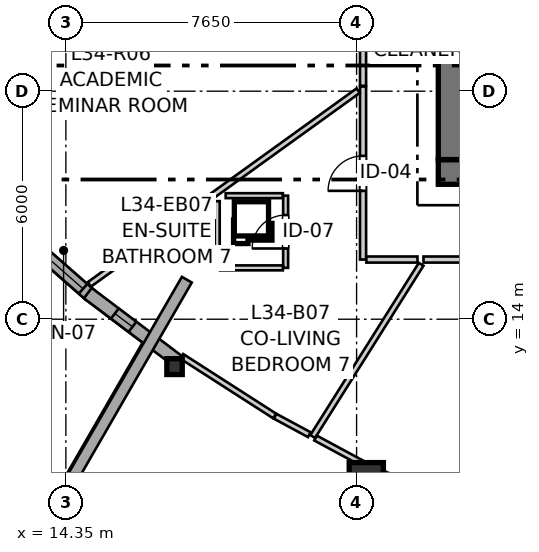
"""IFC4 building model, lengths in metres.
Left out: names, types, materials, properties, quantities, classifications, styles, units other than length and angle.
Written with IfcOpenShell. Run it as: python <this file> out.ifc"""

import sys

from ifc_helpers import new_model, si_unit, direction, frame, frame_2d, origin, origin_2d, place, context, subcontext, project, spatial, rectangle, i_section, extrude, source, transform, mapped, element, fill, save


model = new_model("IFC4")
c1 = context("Model", 3, precision=1e-05, world=origin(), true_north=direction((0.0, 1.0)))
c2 = subcontext(c1, "Body", "Model", "MODEL_VIEW")
j1 = project(units=[si_unit("LENGTHUNIT", "METRE"), si_unit("PLANEANGLEUNIT", "RADIAN")], contexts=[c1])
p1 = place(None, origin())
s1 = spatial("IfcSite", under=j1, at=p1, CompositionType="ELEMENT")
p2 = place(p1, origin())
s2 = spatial("IfcBuilding", under=s1, at=p2, CompositionType="ELEMENT")
p3 = place(p2, frame((0.0, 0.0, 115.2)))
s3 = spatial("IfcBuildingStorey", under=s2, at=p3, CompositionType="ELEMENT", Elevation=115.2)
p4 = place(p3, frame((24.15, 17.875, 0.0), z_axis=(0.0, 0.0, 1.0), x_axis=(1.0, 0.0, 0.0)))
e1 = element("IfcWall", 1, at=p4, inside=s3, PredefinedType="SHEAR", context=c2, shape_type="SweptSolid", body=[
    extrude(rectangle(XDim=12.4, YDim=0.65, at=frame_2d((6.2, 0.0))), origin(), (0.0, 0.0, 1.0), 2.95),
])
p5 = place(p3, frame((24.475, 33.8, 0.0), z_axis=(0.0, 0.0, 1.0), x_axis=(0.0, -1.0, 0.0)))
e2 = element("IfcWall", 2, at=p5, inside=s3, PredefinedType="SHEAR", context=c2, shape_type="SweptSolid", body=[
    extrude(rectangle(XDim=15.6, YDim=0.65, at=frame_2d((7.8, 0.0))), origin(), (0.0, 0.0, 1.0), 2.95),
])
p6 = place(p5, frame((7.05, 0.0, 0.0)))
e3 = element("IfcOpeningElement", 3, at=p6, cuts=e2, PredefinedType="OPENING", context=c2, shape_type="SweptSolid", body=[
    extrude(rectangle(XDim=1.5, YDim=2.15, at=frame_2d((0.75, 1.075))), frame((0.0, 0.335, 0.0), z_axis=(0.0, -1.0, 0.0), x_axis=(1.0, 0.0, 0.0)), (0.0, 0.0, 1.0), 0.67),
])
p7 = place(p5, frame((3.52, 0.0, 0.0)))
e4 = element("IfcOpeningElement", 4, at=p7, cuts=e2, PredefinedType="OPENING", context=c2, shape_type="SweptSolid", body=[
    extrude(rectangle(XDim=0.86, YDim=2.05, at=frame_2d((0.43, 1.025))), frame((0.0, 0.335, 0.0), z_axis=(0.0, -1.0, 0.0), x_axis=(1.0, 0.0, 0.0)), (0.0, 0.0, 1.0), 0.67),
])
p8 = place(p5, frame((11.22, 0.0, 0.0)))
e5 = element("IfcOpeningElement", 5, at=p8, cuts=e2, PredefinedType="OPENING", context=c2, shape_type="SweptSolid", body=[
    extrude(rectangle(XDim=0.86, YDim=2.05, at=frame_2d((0.43, 1.025))), frame((0.0, 0.335, 0.0), z_axis=(0.0, -1.0, 0.0), x_axis=(1.0, 0.0, 0.0)), (0.0, 0.0, 1.0), 0.67),
])
m1 = source(origin(), c2, "Body", "SweptSolid", [
    extrude(i_section(OverallWidth=0.406, OverallDepth=0.416, WebThickness=0.027, FlangeThickness=0.044, FilletRadius=0.015, at=origin_2d()), origin(), (0.0, 0.0, 1.0), 2.95),
])
p9 = place(p3, frame((17.209, 12.753, 0.0), z_axis=(0.0, 0.0, 1.0), x_axis=(1.0, 0.0, 0.0)))
e6 = element("IfcColumn", 6, at=p9, inside=s3, PredefinedType="PILASTER", context=c2, shape_type="MappedRepresentation", body=[
    mapped(m1, transform((0.0, 0.0, 0.0), x_axis=(1.0, 0.0, 0.0), y_axis=(0.0, 1.0, 0.0), z_axis=(0.0, 0.0, 1.0), scale=1.0)),
])
m2 = source(origin(), c2, "Body", "SweptSolid", [
    extrude(rectangle(XDim=0.9, YDim=0.9, at=origin_2d()), origin(), (0.0, 0.0, 1.0), 2.95),
])
p10 = place(p3, frame((22.256, 9.778, 0.0), z_axis=(0.0, 0.0, 1.0), x_axis=(1.0, 0.0, 0.0)))
e7 = element("IfcColumn", 7, at=p10, inside=s3, PredefinedType="COLUMN", context=c2, shape_type="MappedRepresentation", body=[
    mapped(m2, transform((0.0, 0.0, 0.0), x_axis=(1.0, 0.0, 0.0), y_axis=(0.0, 1.0, 0.0), z_axis=(0.0, 0.0, 1.0), scale=1.0)),
])
p11 = place(p3, frame((12.901, 16.471, 0.0), z_axis=(0.0, 0.0, 1.0), x_axis=(0.751480442913, -0.659755366722, 0.0)))
e8 = element("IfcWall", 8, at=p11, inside=s3, PredefinedType="SOLIDWALL", context=c2, shape_type="SweptSolid", body=[
    extrude(rectangle(XDim=2.789, YDim=0.34, at=frame_2d((1.395, 0.0))), origin(), (0.0, 0.0, 1.0), 2.48),
])
p12 = place(p11, frame((0.43, 0.0, 0.82)))
e9 = element("IfcOpeningElement", 9, at=p12, cuts=e8, PredefinedType="OPENING", context=c2, shape_type="SweptSolid", body=[
    extrude(rectangle(XDim=2.1, YDim=1.4, at=frame_2d((1.05, 0.7))), frame((0.0, 0.18, 0.0), z_axis=(0.0, -1.0, 0.0), x_axis=(1.0, 0.0, 0.0)), (0.0, 0.0, 1.0), 0.36),
])
p13 = place(p3, frame((14.928, 14.686, 0.0), z_axis=(0.0, 0.0, 1.0), x_axis=(0.798387010211, -0.602144651995, 0.0)))
e10 = element("IfcWall", 10, at=p13, inside=s3, PredefinedType="SOLIDWALL", context=c2, shape_type="SweptSolid", body=[
    extrude(rectangle(XDim=2.966, YDim=0.34, at=frame_2d((1.483, 0.0))), origin(), (0.0, 0.0, 1.0), 2.48),
])
p14 = place(p13, frame((0.891, 0.0, 0.82)))
e11 = element("IfcOpeningElement", 11, at=p14, cuts=e10, PredefinedType="OPENING", context=c2, shape_type="SweptSolid", body=[
    extrude(rectangle(XDim=0.58, YDim=1.35, at=frame_2d((0.29, 0.675))), frame((0.0, 0.18, 0.0), z_axis=(0.0, -1.0, 0.0), x_axis=(1.0, 0.0, 0.0)), (0.0, 0.0, 1.0), 0.36),
])
p15 = place(p3, frame((17.533, 15.04, 0.0), z_axis=(0.0, 0.0, 1.0), x_axis=(-0.499995950774, -0.866027741594, 0.0)))
e12 = element("IfcWall", 12, at=p15, inside=s3, PredefinedType="SOLIDWALL", context=c2, shape_type="SweptSolid", body=[
    extrude(rectangle(XDim=20.091, YDim=0.3, at=frame_2d((10.045, 0.0))), origin(), (0.0, 0.0, 1.0), 2.13),
])
p16 = place(p3, frame((30.486, 15.57, 0.0), z_axis=(0.0, 0.0, 1.0), x_axis=(-1.0, 0.0, 0.0)))
e13 = element("IfcWall", 13, at=p16, inside=s3, PredefinedType="PARTITIONING", context=c2, shape_type="SweptSolid", body=[
    extrude(rectangle(XDim=6.725, YDim=0.16, at=frame_2d((3.363, 0.0))), origin(), (0.0, 0.0, 1.0), 2.95),
])
p17 = place(p16, frame((2.711, 0.0, 0.0)))
e14 = element("IfcOpeningElement", 14, at=p17, cuts=e13, PredefinedType="OPENING", context=c2, shape_type="SweptSolid", body=[
    extrude(rectangle(XDim=1.3, YDim=2.1, at=frame_2d((0.65, 1.05))), frame((0.0, 0.09, 0.0), z_axis=(0.0, -1.0, 0.0), x_axis=(1.0, 0.0, 0.0)), (0.0, 0.0, 1.0), 0.18),
])
p18 = place(p3, frame((22.17, 15.57, 0.0), z_axis=(0.0, 0.0, 1.0), x_axis=(0.0, 1.0, 0.0)))
e15 = element("IfcWall", 15, at=p18, inside=s3, PredefinedType="PARTITIONING", context=c2, shape_type="SweptSolid", body=[
    extrude(rectangle(XDim=4.555, YDim=0.16, at=frame_2d((2.277, 0.0))), origin(), (0.0, 0.0, 1.0), 2.95),
])
p19 = place(p18, frame((1.808, 0.0, 0.0)))
e16 = element("IfcOpeningElement", 16, at=p19, cuts=e15, PredefinedType="OPENING", context=c2, shape_type="SweptSolid", body=[
    extrude(rectangle(XDim=0.92, YDim=2.1, at=frame_2d((0.46, 1.05))), frame((0.0, 0.09, 0.0), z_axis=(0.0, -1.0, 0.0), x_axis=(1.0, 0.0, 0.0)), (0.0, 0.0, 1.0), 0.18),
])
p20 = place(p3, frame((22.17, 20.14, 0.0), z_axis=(0.0, 0.0, 1.0), x_axis=(0.0, 1.0, 0.0)))
e17 = element("IfcWall", 17, at=p20, inside=s3, PredefinedType="PARTITIONING", context=c2, shape_type="SweptSolid", body=[
    extrude(rectangle(XDim=4.01, YDim=0.16, at=frame_2d((2.005, 0.0))), origin(), (0.0, 0.0, 1.0), 2.95),
])
p21 = place(p20, frame((1.375, 0.0, 0.0)))
e18 = element("IfcOpeningElement", 18, at=p21, cuts=e17, PredefinedType="OPENING", context=c2, shape_type="SweptSolid", body=[
    extrude(rectangle(XDim=1.3, YDim=2.1, at=frame_2d((0.65, 1.05))), frame((0.0, 0.09, 0.0), z_axis=(0.0, -1.0, 0.0), x_axis=(1.0, 0.0, 0.0)), (0.0, 0.0, 1.0), 0.18),
])
p22 = place(p3, frame((25.071, 8.884, 0.0), z_axis=(0.0, 0.0, 1.0), x_axis=(-0.913404708383, 0.407052623997, 0.0)))
e19 = element("IfcWall", 19, at=p22, inside=s3, PredefinedType="PARTITIONING", context=c2, shape_type="SweptSolid", body=[
    extrude(rectangle(XDim=2.923, YDim=0.145, at=frame_2d((1.462, 0.0))), origin(), (0.0, 0.0, 1.0), 2.468),
])
p23 = place(p22, frame((0.22, 0.0, 0.0)))
e20 = element("IfcOpeningElement", 20, at=p23, cuts=e19, PredefinedType="OPENING", context=c2, shape_type="SweptSolid", body=[
    extrude(rectangle(XDim=0.96, YDim=2.1, at=frame_2d((0.48, 1.05))), frame((0.0, 0.083, 0.0), z_axis=(0.0, -1.0, 0.0), x_axis=(1.0, 0.0, 0.0)), (0.0, 0.0, 1.0), 0.165),
])
p24 = place(p3, frame((20.133, 15.351, 0.0), z_axis=(0.0, 0.0, 1.0), x_axis=(0.0, 1.0, 0.0)))
e21 = element("IfcWall", 21, at=p24, inside=s3, PredefinedType="PARTITIONING", context=c2, shape_type="SweptSolid", body=[
    extrude(rectangle(XDim=1.9, YDim=0.13, at=frame_2d((0.95, 0.0))), origin(), (0.0, 0.0, 1.0), 2.95),
])
p25 = place(p24, frame((0.51, 0.0, 0.0)))
e22 = element("IfcOpeningElement", 22, at=p25, cuts=e21, PredefinedType="OPENING", context=c2, shape_type="SweptSolid", body=[
    extrude(rectangle(XDim=0.88, YDim=2.05, at=frame_2d((0.44, 1.025))), frame((0.0, 0.075, 0.0), z_axis=(0.0, -1.0, 0.0), x_axis=(1.0, 0.0, 0.0)), (0.0, 0.0, 1.0), 0.15),
])
p26 = place(p3, frame((14.966, 14.915, 0.0), z_axis=(0.0, 0.0, 1.0), x_axis=(0.811310715309, 0.584615192434, 0.0)))
e23 = element("IfcWall", 23, at=p26, inside=s3, PredefinedType="PARTITIONING", context=c2, shape_type="SweptSolid", body=[
    extrude(rectangle(XDim=8.72, YDim=0.145, at=frame_2d((4.36, 0.0))), origin(), (0.0, 0.0, 1.0), 2.118),
])
p27 = place(p3, frame((20.845, 10.914, 0.0), z_axis=(0.0, 0.0, 1.0), x_axis=(0.533007953382, 0.846110230189, 0.0)))
e24 = element("IfcWall", 24, at=p27, inside=s3, PredefinedType="PARTITIONING", context=c2, shape_type="SweptSolid", body=[
    extrude(rectangle(XDim=5.354, YDim=0.145, at=frame_2d((2.677, 0.0))), origin(), (0.0, 0.0, 1.0), 2.95),
])
p28 = place(p3, frame((17.398, 13.024, 0.0), z_axis=(0.0, 0.0, 1.0), x_axis=(0.841590343852, -0.540116369994, 0.0)))
e25 = element("IfcWall", 25, at=p28, inside=s3, PredefinedType="PARTITIONING", context=c2, shape_type="SweptSolid", body=[
    extrude(rectangle(XDim=2.906, YDim=0.145, at=frame_2d((1.453, 0.0))), origin(), (0.0, 0.0, 1.0), 2.468),
])
p29 = place(p3, frame((18.333, 15.351, 0.0), z_axis=(0.0, 0.0, 1.0), x_axis=(0.0, 1.0, 0.0)))
e26 = element("IfcWall", 26, at=p29, inside=s3, PredefinedType="PARTITIONING", context=c2, shape_type="SweptSolid", body=[
    extrude(rectangle(XDim=1.756, YDim=0.13, at=frame_2d((0.878, 0.0))), origin(), (0.0, 0.0, 1.0), 2.95),
])
p30 = place(p3, frame((18.555, 17.251, 0.0), z_axis=(0.0, 0.0, 1.0), x_axis=(1.0, 0.0, 0.0)))
e27 = element("IfcWall", 27, at=p30, inside=s3, PredefinedType="PARTITIONING", context=c2, shape_type="SweptSolid", body=[
    extrude(rectangle(XDim=1.505, YDim=0.13, at=frame_2d((0.752, 0.0))), origin(), (0.0, 0.0, 1.0), 2.95),
])
p31 = place(p3, frame((18.406, 15.351, 0.0), z_axis=(0.0, 0.0, 1.0), x_axis=(1.0, 0.0, 0.0)))
e28 = element("IfcWall", 28, at=p31, inside=s3, PredefinedType="PARTITIONING", context=c2, shape_type="SweptSolid", body=[
    extrude(rectangle(XDim=1.654, YDim=0.13, at=frame_2d((0.827, 0.0))), origin(), (0.0, 0.0, 1.0), 2.95),
])
p32 = place(p3, frame((20.92, 10.873, 0.0), z_axis=(0.0, 0.0, 1.0), x_axis=(0.879929881444, -0.475103571595, 0.0)))
e29 = element("IfcWall", 29, at=p32, inside=s3, PredefinedType="PARTITIONING", context=c2, shape_type="SweptSolid", body=[
    extrude(rectangle(XDim=1.667, YDim=0.145, at=frame_2d((0.834, 0.0))), origin(), (0.0, 0.0, 1.0), 2.468),
])
p33 = place(p3, frame((22.258, 15.57, 0.0), z_axis=(0.0, 0.0, 1.0), x_axis=(1.0, 0.0, 0.0)))
e30 = element("IfcWall", 30, at=p33, inside=s3, PredefinedType="PARTITIONING", context=c2, shape_type="SweptSolid", body=[
    extrude(rectangle(XDim=1.344, YDim=0.16, at=frame_2d((0.672, 0.0))), origin(), (0.0, 0.0, 1.0), 2.95),
])
p34 = place(p3, frame((19.857, 11.447, 0.0), z_axis=(0.0, 0.0, 1.0), x_axis=(0.8800411893, -0.474897362738, 0.0)))
e31 = element("IfcWall", 31, at=p34, inside=s3, PredefinedType="PARTITIONING", context=c2, shape_type="SweptSolid", body=[
    extrude(rectangle(XDim=1.022, YDim=0.145, at=frame_2d((0.511, 0.0))), origin(), (0.0, 0.0, 1.0), 2.468),
])
m3 = source(origin(), c2, "Body", "SweptSolid", [
    extrude(rectangle(XDim=2.1, YDim=1.4, at=frame_2d((1.05, 0.7))), frame((0.0, 0.03, 0.0), z_axis=(0.0, -1.0, 0.0), x_axis=(1.0, 0.0, 0.0)), (0.0, 0.0, 1.0), 0.06),
])
p35 = place(p12, origin())
e32 = element("IfcWindow", 32, at=p35, inside=s3, PartitioningType="SINGLE_PANEL", PredefinedType="WINDOW", context=c2, shape_type="MappedRepresentation", body=[
    mapped(m3, transform((0.0, 0.0, 0.0), x_axis=(1.0, 0.0, 0.0), y_axis=(0.0, 1.0, 0.0), z_axis=(0.0, 0.0, 1.0), scale=1.0)),
])
fill(e9, e32)
m4 = source(origin(), c2, "Body", "SweptSolid", [
    extrude(rectangle(XDim=0.58, YDim=1.35, at=frame_2d((0.29, 0.675))), frame((0.0, 0.03, 0.0), z_axis=(0.0, -1.0, 0.0), x_axis=(1.0, 0.0, 0.0)), (0.0, 0.0, 1.0), 0.06),
])
p36 = place(p14, origin())
e33 = element("IfcWindow", 33, at=p36, inside=s3, PartitioningType="SINGLE_PANEL", PredefinedType="WINDOW", context=c2, shape_type="MappedRepresentation", body=[
    mapped(m4, transform((0.0, 0.0, 0.0), x_axis=(1.0, 0.0, 0.0), y_axis=(0.0, 1.0, 0.0), z_axis=(0.0, 0.0, 1.0), scale=1.0)),
])
fill(e11, e33)
m5 = source(origin(), c2, "Body", "SweptSolid", [
    extrude(rectangle(XDim=0.92, YDim=2.1, at=frame_2d((0.46, 1.05))), frame((0.0, 0.025, 0.0), z_axis=(0.0, -1.0, 0.0), x_axis=(1.0, 0.0, 0.0)), (0.0, 0.0, 1.0), 0.05),
])
p37 = place(p19, origin())
e34 = element("IfcDoor", 34, at=p37, inside=s3, OperationType="SINGLE_SWING_LEFT", PredefinedType="DOOR", context=c2, shape_type="MappedRepresentation", body=[
    mapped(m5, transform((0.0, 0.0, 0.0), x_axis=(1.0, 0.0, 0.0), y_axis=(0.0, 1.0, 0.0), z_axis=(0.0, 0.0, 1.0), scale=1.0)),
])
fill(e16, e34)
m6 = source(origin(), c2, "Body", "SweptSolid", [
    extrude(rectangle(XDim=0.88, YDim=2.05, at=frame_2d((0.44, 1.025))), frame((0.0, 0.025, 0.0), z_axis=(0.0, -1.0, 0.0), x_axis=(1.0, 0.0, 0.0)), (0.0, 0.0, 1.0), 0.05),
])
p38 = place(p25, origin())
e35 = element("IfcDoor", 35, at=p38, inside=s3, OperationType="SINGLE_SWING_LEFT", PredefinedType="DOOR", context=c2, shape_type="MappedRepresentation", body=[
    mapped(m6, transform((0.0, 0.0, 0.0), x_axis=(1.0, 0.0, 0.0), y_axis=(0.0, 1.0, 0.0), z_axis=(0.0, 0.0, 1.0), scale=1.0)),
])
fill(e22, e35)
save(model, sys.argv[1])
